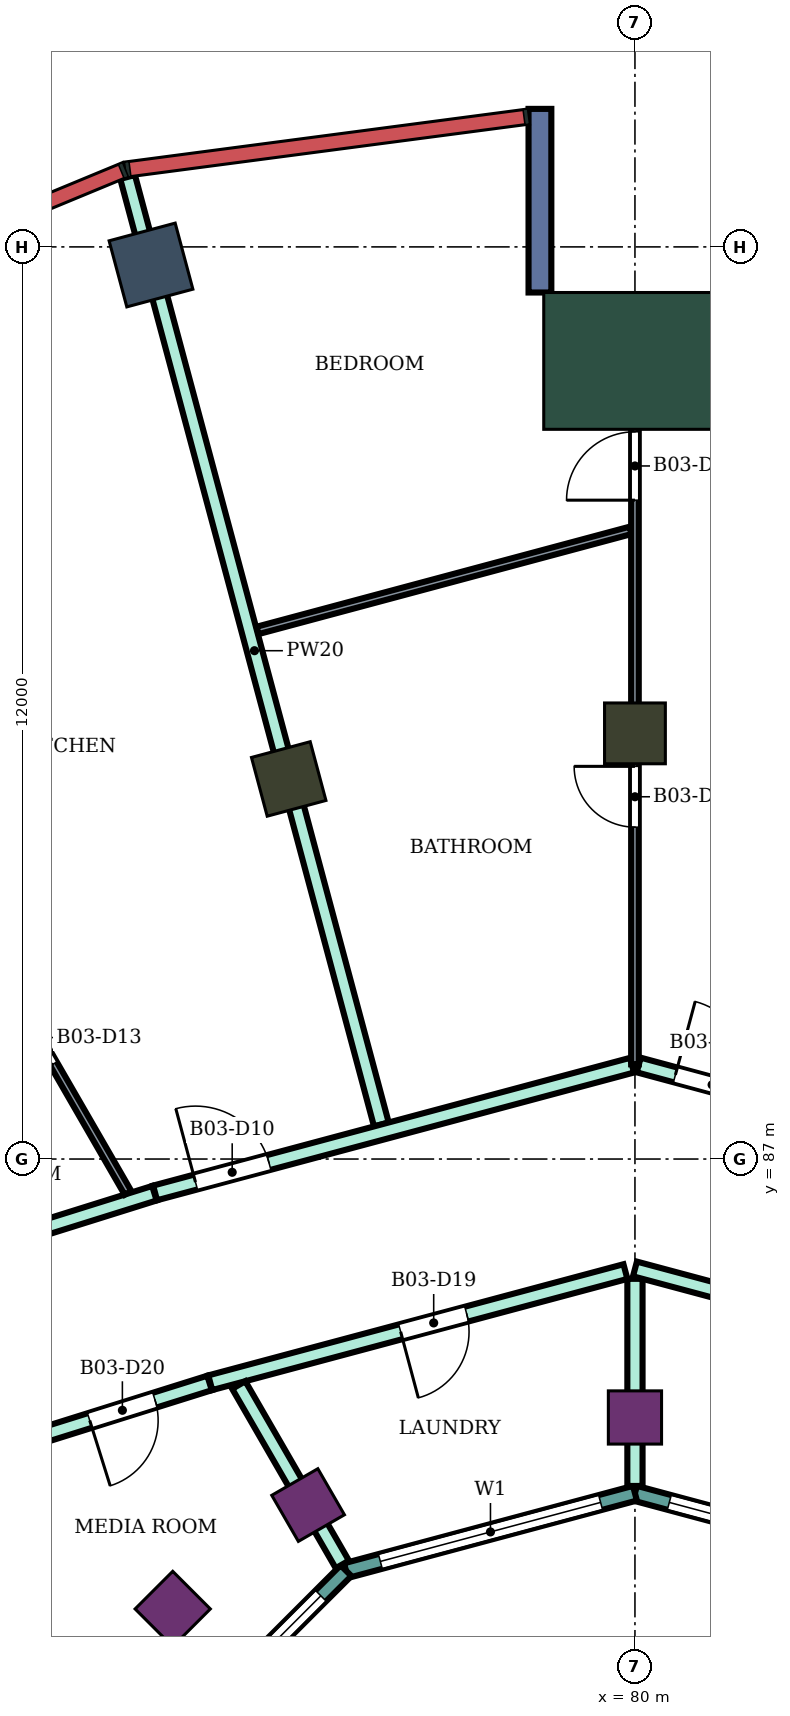
"""IFC4 building model, lengths in metres.
Left out: names, types, materials, properties, quantities, classifications, styles, units other than length and angle.
Written with IfcOpenShell. Run it as: python <this file> out.ifc"""

import sys

from ifc_helpers import new_model, si_unit, direction, frame, frame_2d, origin, origin_2d, place, context, subcontext, project, spatial, rectangle, extrude, element, fill, save


model = new_model("IFC4")
c1 = context("Model", 3, precision=1e-05, world=origin(), true_north=direction((0.0, 1.0)))
c2 = subcontext(c1, "Body", "Model", "MODEL_VIEW")
j1 = project(units=[si_unit("LENGTHUNIT", "METRE"), si_unit("PLANEANGLEUNIT", "RADIAN")], contexts=[c1])
p1 = place(None, origin())
s1 = spatial("IfcSite", under=j1, at=p1, CompositionType="ELEMENT")
p2 = place(p1, origin())
s2 = spatial("IfcBuilding", under=s1, at=p2, CompositionType="ELEMENT")
p3 = place(p2, frame((0.0, 0.0, 245.7)))
s3 = spatial("IfcBuildingStorey", under=s2, at=p3, CompositionType="ELEMENT", Elevation=245.7)
p4 = place(p3, frame((73.633, 98.762, 0.0), z_axis=(0.0, 0.0, 1.0), x_axis=(-0.258819045103, 0.965925826289, 0.0)))
e1 = element("IfcColumn", 1, at=p4, inside=s3, PredefinedType="COLUMN", context=c2, shape_type="SweptSolid", body=[
    extrude(rectangle(XDim=0.9, YDim=0.9, at=origin_2d()), origin(), (0.0, 0.0, 1.0), 4.2),
])
for number, where, z_axis, x_axis in (
    (2, (80.0, 92.6, 0.0), (0.0, 0.0, 1.0), (0.0, 1.0, 0.0)),
    (3, (75.445, 92.0, 0.0), (0.0, 0.0, 1.0), (-0.259, 0.966, 0.0)),
):
    element("IfcColumn", number, at=place(p3, frame(where, z_axis=z_axis, x_axis=x_axis)), inside=s3, PredefinedType="COLUMN", context=c2, shape_type="SweptSolid", body=[
        extrude(rectangle(XDim=0.8, YDim=0.8, at=origin_2d()), origin(), (0.0, 0.0, 1.0), 4.2),
    ])
for number, where, z_axis, x_axis in (
    (4, (80.0, 83.6, 0.0), (0.0, 0.0, 1.0), (0.0, 1.0, 0.0)),
    (5, (75.7, 82.448, 0.0), (0.0, 0.0, 1.0), (-0.5, 0.866, 0.0)),
    (6, (73.919, 81.081, 0.0), (0.0, 0.0, 1.0), (-0.707, 0.707, 0.0)),
):
    element("IfcColumn", number, at=place(p3, frame(where, z_axis=z_axis, x_axis=x_axis)), inside=s3, PredefinedType="COLUMN", context=c2, shape_type="SweptSolid", body=[
        extrude(rectangle(XDim=0.7, YDim=0.7, at=origin_2d()), origin(), (0.0, 0.0, 1.0), 4.2),
    ])
p5 = place(p3, frame((80.0, 97.5, 0.0), z_axis=(0.0, 0.0, 1.0), x_axis=(0.0, 1.0, 0.0)))
e7 = element("IfcColumn", 7, at=p5, inside=s3, PredefinedType="COLUMN", context=c2, shape_type="SweptSolid", body=[
    extrude(rectangle(XDim=1.8, YDim=2.4, at=origin_2d()), origin(), (0.0, 0.0, 1.0), 4.2),
])
p6 = place(p3, frame((78.75, 98.4, 0.0), z_axis=(0.0, 0.0, 1.0), x_axis=(0.0, 1.0, 0.0)))
e8 = element("IfcWall", 8, at=p6, inside=s3, PredefinedType="NOTDEFINED", context=c2, shape_type="SweptSolid", body=[
    extrude(rectangle(XDim=2.416, YDim=0.3, at=frame_2d((1.208, 0.0))), origin(), (0.0, 0.0, 1.0), 4.2),
])
p7 = place(p3, frame((83.802, 81.585, 0.0), z_axis=(0.0, 0.0, 1.0), x_axis=(-0.965933654434, 0.258789828301, 0.0)))
e9 = element("IfcWall", 9, at=p7, inside=s3, PredefinedType="NOTDEFINED", context=c2, shape_type="SweptSolid", body=[
    extrude(rectangle(XDim=3.936, YDim=0.2, at=frame_2d((1.968, 0.0))), origin(), (0.0, 0.0, 1.0), 4.2),
])
p8 = place(p7, frame((0.468, 0.0, 0.9)))
e10 = element("IfcOpeningElement", 10, at=p8, cuts=e9, PredefinedType="OPENING", context=c2, shape_type="SweptSolid", body=[
    extrude(rectangle(XDim=3.0, YDim=2.3, at=frame_2d((1.5, 1.15))), frame((0.0, 0.11, 0.0), z_axis=(0.0, -1.0, 0.0), x_axis=(1.0, 0.0, 0.0)), (0.0, 0.0, 1.0), 0.22),
])
p9 = place(p3, frame((80.0, 82.604, 0.0), z_axis=(0.0, 0.0, 1.0), x_axis=(-0.965933654434, -0.258789828301, 0.0)))
e11 = element("IfcWall", 11, at=p9, inside=s3, PredefinedType="NOTDEFINED", context=c2, shape_type="SweptSolid", body=[
    extrude(rectangle(XDim=3.936, YDim=0.2, at=frame_2d((1.968, 0.0))), origin(), (0.0, 0.0, 1.0), 4.2),
])
p10 = place(p9, frame((0.468, 0.0, 0.9)))
e12 = element("IfcOpeningElement", 12, at=p10, cuts=e11, PredefinedType="OPENING", context=c2, shape_type="SweptSolid", body=[
    extrude(rectangle(XDim=3.0, YDim=2.3, at=frame_2d((1.5, 1.15))), frame((0.0, 0.11, 0.0), z_axis=(0.0, -1.0, 0.0), x_axis=(1.0, 0.0, 0.0)), (0.0, 0.0, 1.0), 0.22),
])
p11 = place(p3, frame((76.198, 81.585, 0.0), z_axis=(0.0, 0.0, 1.0), x_axis=(-0.707106781187, -0.707106781187, 0.0)))
e13 = element("IfcWall", 13, at=p11, inside=s3, PredefinedType="NOTDEFINED", context=c2, shape_type="SweptSolid", body=[
    extrude(rectangle(XDim=3.936, YDim=0.2, at=frame_2d((1.968, 0.0))), origin(), (0.0, 0.0, 1.0), 4.2),
])
p12 = place(p11, frame((0.468, 0.0, 0.9)))
e14 = element("IfcOpeningElement", 14, at=p12, cuts=e13, PredefinedType="OPENING", context=c2, shape_type="SweptSolid", body=[
    extrude(rectangle(XDim=3.0, YDim=2.3, at=frame_2d((1.5, 1.15))), frame((0.0, 0.11, 0.0), z_axis=(0.0, -1.0, 0.0), x_axis=(1.0, 0.0, 0.0)), (0.0, 0.0, 1.0), 0.22),
])
p13 = place(p3, frame((68.2, 84.834, 0.0), z_axis=(0.0, 0.0, 1.0), x_axis=(0.954272398161, 0.298938438661, 0.0)))
e15 = element("IfcWall", 15, at=p13, inside=s3, PredefinedType="PARTITIONING", context=c2, shape_type="SweptSolid", body=[
    extrude(rectangle(XDim=5.74, YDim=0.2, at=frame_2d((2.87, 0.0))), origin(), (0.0, 0.0, 1.0), 3.75),
])
p14 = place(p3, frame((72.1, 83.332, 0.0), z_axis=(0.0, 0.0, 1.0), x_axis=(0.954233106619, 0.299063836383, 0.0)))
e16 = element("IfcWall", 16, at=p14, inside=s3, PredefinedType="PARTITIONING", context=c2, shape_type="SweptSolid", body=[
    extrude(rectangle(XDim=2.414, YDim=0.2, at=frame_2d((1.207, 0.0))), origin(), (0.0, 0.0, 1.0), 3.75),
])
p15 = place(p14, frame((0.762, 0.0, 0.0)))
e17 = element("IfcOpeningElement", 17, at=p15, cuts=e16, PredefinedType="OPENING", context=c2, shape_type="SweptSolid", body=[
    extrude(rectangle(XDim=0.9, YDim=2.1, at=frame_2d((0.45, 1.05))), frame((0.0, 0.11, 0.0), z_axis=(0.0, -1.0, 0.0), x_axis=(1.0, 0.0, 0.0)), (0.0, 0.0, 1.0), 0.22),
])
p16 = place(p3, frame((73.325, 99.92, 0.0), z_axis=(0.0, 0.0, 1.0), x_axis=(0.258745857482, -0.965945433881, 0.0)))
e18 = element("IfcWall", 18, at=p16, inside=s3, PredefinedType="PARTITIONING", context=c2, shape_type="SweptSolid", body=[
    extrude(rectangle(XDim=12.904, YDim=0.2, at=frame_2d((6.452, 0.0))), origin(), (0.0, 0.0, 1.0), 3.75),
])
p17 = place(p3, frame((73.687, 86.554, 0.0), z_axis=(0.0, 0.0, 1.0), x_axis=(0.96595928904, 0.258694128106, 0.0)))
e19 = element("IfcWall", 19, at=p17, inside=s3, PredefinedType="PARTITIONING", context=c2, shape_type="SweptSolid", body=[
    extrude(rectangle(XDim=6.496, YDim=0.2, at=frame_2d((3.248, 0.0))), origin(), (0.0, 0.0, 1.0), 3.75),
])
p18 = place(p17, frame((0.55, 0.0, 0.0)))
e20 = element("IfcOpeningElement", 20, at=p18, cuts=e19, PredefinedType="OPENING", context=c2, shape_type="SweptSolid", body=[
    extrude(rectangle(XDim=1.0, YDim=2.1, at=frame_2d((0.5, 1.05))), frame((0.0, 0.11, 0.0), z_axis=(0.0, -1.0, 0.0), x_axis=(1.0, 0.0, 0.0)), (0.0, 0.0, 1.0), 0.22),
])
p19 = place(p3, frame((74.413, 84.057, 0.0), z_axis=(0.0, 0.0, 1.0), x_axis=(0.965972135939, 0.258646153246, 0.0)))
e21 = element("IfcWall", 21, at=p19, inside=s3, PredefinedType="PARTITIONING", context=c2, shape_type="SweptSolid", body=[
    extrude(rectangle(XDim=5.654, YDim=0.2, at=frame_2d((2.827, 0.0))), origin(), (0.0, 0.0, 1.0), 3.75),
])
p20 = place(p19, frame((2.593, 0.0, 0.0)))
e22 = element("IfcOpeningElement", 22, at=p20, cuts=e21, PredefinedType="OPENING", context=c2, shape_type="SweptSolid", body=[
    extrude(rectangle(XDim=0.9, YDim=2.1, at=frame_2d((0.45, 1.05))), frame((0.0, 0.11, 0.0), z_axis=(0.0, -1.0, 0.0), x_axis=(1.0, 0.0, 0.0)), (0.0, 0.0, 1.0), 0.22),
])
p21 = place(p3, frame((74.787, 84.027, 0.0), z_axis=(0.0, 0.0, 1.0), x_axis=(0.500079107518, -0.86597972622, 0.0)))
e23 = element("IfcWall", 23, at=p21, inside=s3, PredefinedType="PARTITIONING", context=c2, shape_type="SweptSolid", body=[
    extrude(rectangle(XDim=2.726, YDim=0.2, at=frame_2d((1.363, 0.0))), origin(), (0.0, 0.0, 1.0), 3.75),
])
p22 = place(p3, frame((80.0, 82.699, 0.0), z_axis=(0.0, 0.0, 1.0), x_axis=(0.0, 1.0, 0.0)))
e24 = element("IfcWall", 24, at=p22, inside=s3, PredefinedType="PARTITIONING", context=c2, shape_type="SweptSolid", body=[
    extrude(rectangle(XDim=2.725, YDim=0.2, at=frame_2d((1.363, 0.0))), origin(), (0.0, 0.0, 1.0), 3.75),
])
p23 = place(p3, frame((80.0, 85.554, 0.0), z_axis=(0.0, 0.0, 1.0), x_axis=(0.965928989968, -0.258807237802, 0.0)))
e25 = element("IfcWall", 25, at=p23, inside=s3, PredefinedType="PARTITIONING", context=c2, shape_type="SweptSolid", body=[
    extrude(rectangle(XDim=5.774, YDim=0.2, at=frame_2d((2.887, 0.0))), origin(), (0.0, 0.0, 1.0), 3.75),
])
p24 = place(p23, frame((2.292, 0.0, 0.0)))
e26 = element("IfcOpeningElement", 26, at=p24, cuts=e25, PredefinedType="OPENING", context=c2, shape_type="SweptSolid", body=[
    extrude(rectangle(XDim=0.9, YDim=2.1, at=frame_2d((0.45, 1.05))), frame((0.0, 0.11, 0.0), z_axis=(0.0, -1.0, 0.0), x_axis=(1.0, 0.0, 0.0)), (0.0, 0.0, 1.0), 0.22),
])
p25 = place(p3, frame((80.049, 88.237, 0.0), z_axis=(0.0, 0.0, 1.0), x_axis=(0.965582990495, -0.260095152718, 0.0)))
e27 = element("IfcWall", 27, at=p25, inside=s3, PredefinedType="PARTITIONING", context=c2, shape_type="SweptSolid", body=[
    extrude(rectangle(XDim=6.476, YDim=0.2, at=frame_2d((3.238, 0.0))), origin(), (0.0, 0.0, 1.0), 3.75),
])
p26 = place(p25, frame((0.5, 0.0, 0.0)))
e28 = element("IfcOpeningElement", 28, at=p26, cuts=e27, PredefinedType="OPENING", context=c2, shape_type="SweptSolid", body=[
    extrude(rectangle(XDim=1.0, YDim=2.1, at=frame_2d((0.5, 1.05))), frame((0.0, 0.11, 0.0), z_axis=(0.0, -1.0, 0.0), x_axis=(1.0, 0.0, 0.0)), (0.0, 0.0, 1.0), 0.22),
])
p27 = place(p3, frame((67.104, 97.343, 0.0), z_axis=(0.0, 0.0, 1.0), x_axis=(0.499891560959, -0.866088002043, 0.0)))
e29 = element("IfcWall", 29, at=p27, inside=s3, PredefinedType="PARTITIONING", context=c2, shape_type="SweptSolid", body=[
    extrude(rectangle(XDim=12.456, YDim=0.1, at=frame_2d((6.228, 0.0))), origin(), (0.0, 0.0, 1.0), 3.75),
])
p28 = place(p27, frame((2.538, 0.0, 0.0)))
e30 = element("IfcOpeningElement", 30, at=p28, cuts=e29, PredefinedType="OPENING", context=c2, shape_type="SweptSolid", body=[
    extrude(rectangle(XDim=0.9, YDim=2.1, at=frame_2d((0.45, 1.05))), frame((0.0, 0.06, 0.0), z_axis=(0.0, -1.0, 0.0), x_axis=(1.0, 0.0, 0.0)), (0.0, 0.0, 1.0), 0.12),
])
p29 = place(p27, frame((9.697, 0.0, 0.0)))
e31 = element("IfcOpeningElement", 31, at=p29, cuts=e29, PredefinedType="OPENING", context=c2, shape_type="SweptSolid", body=[
    extrude(rectangle(XDim=0.8, YDim=2.1, at=frame_2d((0.4, 1.05))), frame((0.0, 0.06, 0.0), z_axis=(0.0, -1.0, 0.0), x_axis=(1.0, 0.0, 0.0)), (0.0, 0.0, 1.0), 0.12),
])
p30 = place(p3, frame((75.035, 93.955, 0.0), z_axis=(0.0, 0.0, 1.0), x_axis=(0.965868648254, 0.259032342228, 0.0)))
e32 = element("IfcWall", 32, at=p30, inside=s3, PredefinedType="PARTITIONING", context=c2, shape_type="SweptSolid", body=[
    extrude(rectangle(XDim=5.08, YDim=0.1, at=frame_2d((2.54, 0.0))), origin(), (0.0, 0.0, 1.0), 3.75),
])
p31 = place(p3, frame((80.0, 88.246, 0.0), z_axis=(0.0, 0.0, 1.0), x_axis=(0.0, 1.0, 0.0)))
e33 = element("IfcWall", 33, at=p31, inside=s3, PredefinedType="PARTITIONING", context=c2, shape_type="SweptSolid", body=[
    extrude(rectangle(XDim=9.954, YDim=0.1, at=frame_2d((4.977, 0.0))), origin(), (0.0, 0.0, 1.0), 3.75),
])
p32 = place(p31, frame((7.422, 0.0, 0.0)))
e34 = element("IfcOpeningElement", 34, at=p32, cuts=e33, PredefinedType="OPENING", context=c2, shape_type="SweptSolid", body=[
    extrude(rectangle(XDim=0.9, YDim=2.1, at=frame_2d((0.45, 1.05))), frame((0.0, 0.06, 0.0), z_axis=(0.0, -1.0, 0.0), x_axis=(1.0, 0.0, 0.0)), (0.0, 0.0, 1.0), 0.12),
])
p33 = place(p31, frame((3.12, 0.0, 0.0)))
e35 = element("IfcOpeningElement", 35, at=p33, cuts=e33, PredefinedType="OPENING", context=c2, shape_type="SweptSolid", body=[
    extrude(rectangle(XDim=0.8, YDim=2.1, at=frame_2d((0.4, 1.05))), frame((0.0, 0.06, 0.0), z_axis=(0.0, -1.0, 0.0), x_axis=(1.0, 0.0, 0.0)), (0.0, 0.0, 1.0), 0.12),
])
p34 = place(p8, origin())
e36 = element("IfcWindow", 36, at=p34, inside=s3, PartitioningType="SINGLE_PANEL", PredefinedType="WINDOW", context=c2, shape_type="SweptSolid", body=[
    extrude(rectangle(XDim=3.0, YDim=2.3, at=frame_2d((1.5, 1.15))), frame((0.0, 0.03, 0.0), z_axis=(0.0, -1.0, 0.0), x_axis=(1.0, 0.0, 0.0)), (0.0, 0.0, 1.0), 0.06),
])
fill(e10, e36)
p35 = place(p10, origin())
e37 = element("IfcWindow", 37, at=p35, inside=s3, PartitioningType="SINGLE_PANEL", PredefinedType="WINDOW", context=c2, shape_type="SweptSolid", body=[
    extrude(rectangle(XDim=3.0, YDim=2.3, at=frame_2d((1.5, 1.15))), frame((0.0, 0.03, 0.0), z_axis=(0.0, -1.0, 0.0), x_axis=(1.0, 0.0, 0.0)), (0.0, 0.0, 1.0), 0.06),
])
fill(e12, e37)
p36 = place(p12, origin())
e38 = element("IfcWindow", 38, at=p36, inside=s3, PartitioningType="SINGLE_PANEL", PredefinedType="WINDOW", context=c2, shape_type="SweptSolid", body=[
    extrude(rectangle(XDim=3.0, YDim=2.3, at=frame_2d((1.5, 1.15))), frame((0.0, 0.03, 0.0), z_axis=(0.0, -1.0, 0.0), x_axis=(1.0, 0.0, 0.0)), (0.0, 0.0, 1.0), 0.06),
])
fill(e14, e38)
p37 = place(p26, origin())
e39 = element("IfcDoor", 39, at=p37, inside=s3, OperationType="SINGLE_SWING_LEFT", PredefinedType="DOOR", context=c2, shape_type="SweptSolid", body=[
    extrude(rectangle(XDim=1.0, YDim=2.1, at=frame_2d((0.5, 1.05))), frame((0.0, 0.025, 0.0), z_axis=(0.0, -1.0, 0.0), x_axis=(1.0, 0.0, 0.0)), (0.0, 0.0, 1.0), 0.05),
])
fill(e28, e39)
p38 = place(p32, origin())
e40 = element("IfcDoor", 40, at=p38, inside=s3, OperationType="SINGLE_SWING_LEFT", PredefinedType="DOOR", context=c2, shape_type="SweptSolid", body=[
    extrude(rectangle(XDim=0.9, YDim=2.1, at=frame_2d((0.45, 1.05))), frame((0.0, 0.025, 0.0), z_axis=(0.0, -1.0, 0.0), x_axis=(1.0, 0.0, 0.0)), (0.0, 0.0, 1.0), 0.05),
])
fill(e34, e40)
p39 = place(p33, origin())
e41 = element("IfcDoor", 41, at=p39, inside=s3, OperationType="SINGLE_SWING_RIGHT", PredefinedType="DOOR", context=c2, shape_type="SweptSolid", body=[
    extrude(rectangle(XDim=0.8, YDim=2.1, at=frame_2d((0.4, 1.05))), frame((0.0, 0.025, 0.0), z_axis=(0.0, -1.0, 0.0), x_axis=(1.0, 0.0, 0.0)), (0.0, 0.0, 1.0), 0.05),
])
fill(e35, e41)
p40 = place(p18, origin())
e42 = element("IfcDoor", 42, at=p40, inside=s3, OperationType="SINGLE_SWING_LEFT", PredefinedType="DOOR", context=c2, shape_type="SweptSolid", body=[
    extrude(rectangle(XDim=1.0, YDim=2.1, at=frame_2d((0.5, 1.05))), frame((0.0, 0.025, 0.0), z_axis=(0.0, -1.0, 0.0), x_axis=(1.0, 0.0, 0.0)), (0.0, 0.0, 1.0), 0.05),
])
fill(e20, e42)
p41 = place(p29, frame((0.8, 0.0, 0.0), z_axis=(0.0, 0.0, 1.0), x_axis=(-1.0, 0.0, 0.0)))
e43 = element("IfcDoor", 43, at=p41, inside=s3, OperationType="SINGLE_SWING_LEFT", PredefinedType="DOOR", context=c2, shape_type="SweptSolid", body=[
    extrude(rectangle(XDim=0.8, YDim=2.1, at=frame_2d((0.4, 1.05))), frame((0.0, 0.025, 0.0), z_axis=(0.0, -1.0, 0.0), x_axis=(1.0, 0.0, 0.0)), (0.0, 0.0, 1.0), 0.05),
])
fill(e31, e43)
p42 = place(p20, frame((0.9, 0.0, 0.0), z_axis=(0.0, 0.0, 1.0), x_axis=(-1.0, 0.0, 0.0)))
e44 = element("IfcDoor", 44, at=p42, inside=s3, OperationType="SINGLE_SWING_RIGHT", PredefinedType="DOOR", context=c2, shape_type="SweptSolid", body=[
    extrude(rectangle(XDim=0.9, YDim=2.1, at=frame_2d((0.45, 1.05))), frame((0.0, 0.025, 0.0), z_axis=(0.0, -1.0, 0.0), x_axis=(1.0, 0.0, 0.0)), (0.0, 0.0, 1.0), 0.05),
])
fill(e22, e44)
p43 = place(p15, frame((0.9, 0.0, 0.0), z_axis=(0.0, 0.0, 1.0), x_axis=(-1.0, 0.0, 0.0)))
e45 = element("IfcDoor", 45, at=p43, inside=s3, OperationType="SINGLE_SWING_RIGHT", PredefinedType="DOOR", context=c2, shape_type="SweptSolid", body=[
    extrude(rectangle(XDim=0.9, YDim=2.1, at=frame_2d((0.45, 1.05))), frame((0.0, 0.025, 0.0), z_axis=(0.0, -1.0, 0.0), x_axis=(1.0, 0.0, 0.0)), (0.0, 0.0, 1.0), 0.05),
])
fill(e17, e45)
save(model, sys.argv[1])
